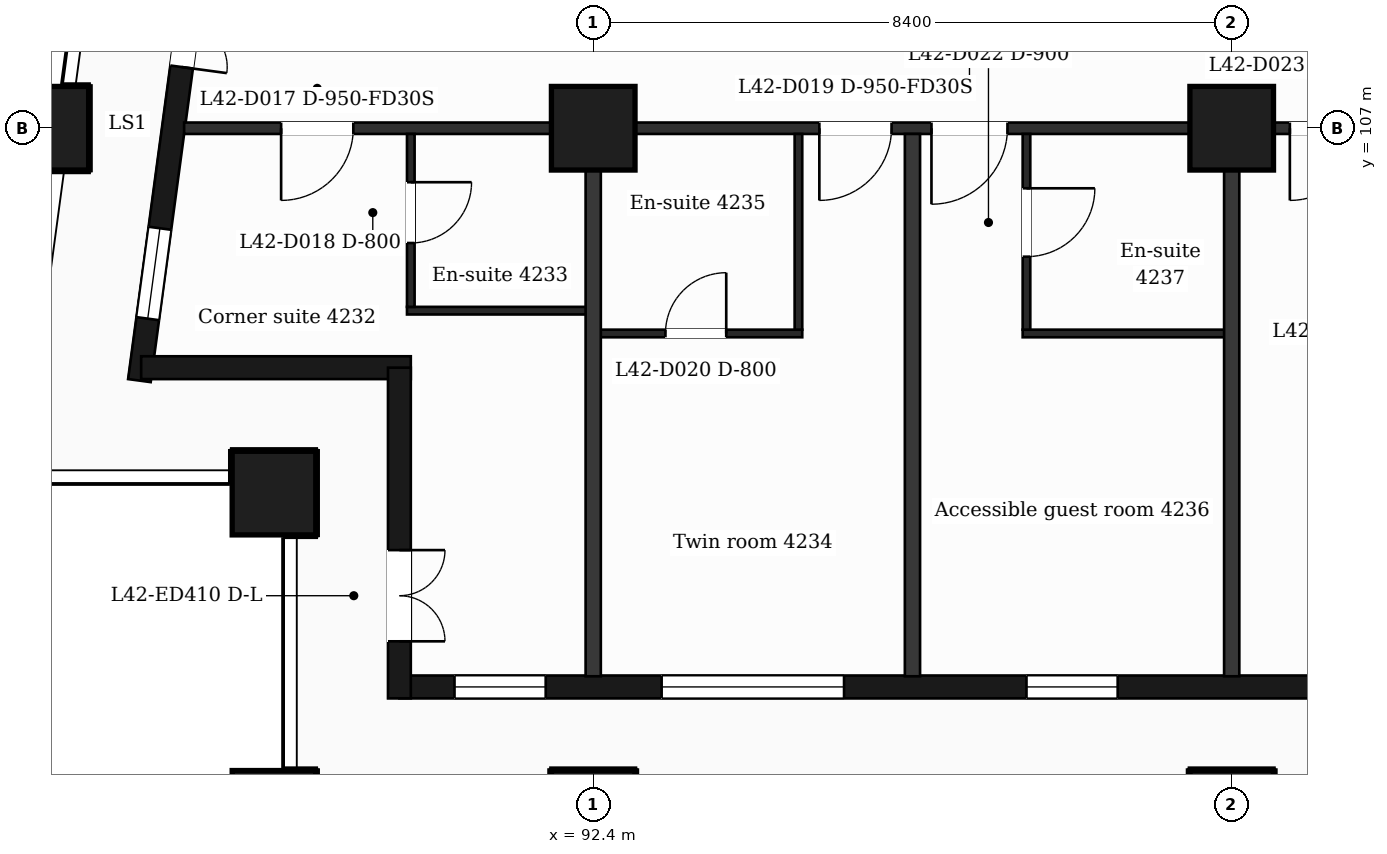
"""IFC4 building model, lengths in metres.
Left out: names, types, materials, properties, quantities, classifications, styles, units other than length and angle.
Written with IfcOpenShell. Run it as: python <this file> out.ifc"""

import sys

from ifc_helpers import new_model, si_unit, direction, frame, frame_2d, origin, origin_2d, place, context, subcontext, project, spatial, rectangle, extrude, element, fill, save


model = new_model("IFC4")
c1 = context("Model", 3, precision=1e-05, world=origin(), true_north=direction((0.0, 1.0)))
c2 = subcontext(c1, "Body", "Model", "MODEL_VIEW")
j1 = project(units=[si_unit("LENGTHUNIT", "METRE"), si_unit("PLANEANGLEUNIT", "RADIAN")], contexts=[c1])
p1 = place(None, origin())
s1 = spatial("IfcSite", under=j1, at=p1, CompositionType="ELEMENT")
p2 = place(p1, origin())
s2 = spatial("IfcBuilding", under=s1, at=p2, CompositionType="ELEMENT")
p3 = place(p2, frame((0.0, 0.0, 177.4)))
s3 = spatial("IfcBuildingStorey", under=s2, at=p3, CompositionType="ELEMENT", Elevation=177.4)
for number, where, z_axis, x_axis in (
    (1, (92.4, 98.0, 0.0), (0.0, 0.0, 1.0), (1.0, 0.0, 0.0)),
    (2, (100.8, 98.0, 0.0), (0.0, 0.0, 1.0), (1.0, 0.0, 0.0)),
    (3, (88.2, 98.0, 0.0), (0.0, 0.0, 1.0), (1.0, 0.0, 0.0)),
    (4, (88.2, 102.2, 0.0), (0.0, 0.0, 1.0), (1.0, 0.0, 0.0)),
    (5, (92.4, 107.0, 0.0), (0.0, 0.0, 1.0), (1.0, 0.0, 0.0)),
    (6, (100.8, 107.0, 0.0), (0.0, 0.0, 1.0), (1.0, 0.0, 0.0)),
    (7, (85.211, 107.0, 0.0), (0.0, 0.0, 1.0), (1.0, 0.0, 0.0)),
):
    element("IfcColumn", number, at=place(p3, frame(where, z_axis=z_axis, x_axis=x_axis)), inside=s3, PredefinedType="COLUMN", context=c2, shape_type="SweptSolid", body=[
        extrude(rectangle(XDim=1.1, YDim=1.1, at=origin_2d()), origin(), (0.0, 0.0, 1.0), 3.7),
    ])
p4 = place(p3, frame((89.85, 99.65, 0.0), z_axis=(0.0, 0.0, 1.0), x_axis=(1.0, 0.0, 0.0)))
e8 = element("IfcWall", 8, at=p4, inside=s3, PredefinedType="SOLIDWALL", context=c2, shape_type="SweptSolid", body=[
    extrude(rectangle(XDim=47.25, YDim=0.3, at=frame_2d((23.625, 0.0))), origin(), (0.0, 0.0, 1.0), 3.38),
])
p5 = place(p4, frame((0.725, 0.0, 0.9)))
e9 = element("IfcOpeningElement", 9, at=p5, cuts=e8, PredefinedType="OPENING", context=c2, shape_type="SweptSolid", body=[
    extrude(rectangle(XDim=1.2, YDim=2.1, at=frame_2d((0.6, 1.05))), frame((0.0, 0.16, 0.0), z_axis=(0.0, -1.0, 0.0), x_axis=(1.0, 0.0, 0.0)), (0.0, 0.0, 1.0), 0.32),
])
p6 = place(p4, frame((3.45, 0.0, 0.9)))
e10 = element("IfcOpeningElement", 10, at=p6, cuts=e8, PredefinedType="OPENING", context=c2, shape_type="SweptSolid", body=[
    extrude(rectangle(XDim=2.4, YDim=2.1, at=frame_2d((1.2, 1.05))), frame((0.0, 0.16, 0.0), z_axis=(0.0, -1.0, 0.0), x_axis=(1.0, 0.0, 0.0)), (0.0, 0.0, 1.0), 0.32),
])
p7 = place(p4, frame((8.25, 0.0, 0.9)))
e11 = element("IfcOpeningElement", 11, at=p7, cuts=e8, PredefinedType="OPENING", context=c2, shape_type="SweptSolid", body=[
    extrude(rectangle(XDim=1.2, YDim=2.1, at=frame_2d((0.6, 1.05))), frame((0.0, 0.16, 0.0), z_axis=(0.0, -1.0, 0.0), x_axis=(1.0, 0.0, 0.0)), (0.0, 0.0, 1.0), 0.32),
])
p8 = place(p4, frame((12.45, 0.0, 0.9)))
e12 = element("IfcOpeningElement", 12, at=p8, cuts=e8, PredefinedType="OPENING", context=c2, shape_type="SweptSolid", body=[
    extrude(rectangle(XDim=1.2, YDim=2.1, at=frame_2d((0.6, 1.05))), frame((0.0, 0.16, 0.0), z_axis=(0.0, -1.0, 0.0), x_axis=(1.0, 0.0, 0.0)), (0.0, 0.0, 1.0), 0.32),
])
p9 = place(p4, frame((16.05, 0.0, 0.9)))
e13 = element("IfcOpeningElement", 13, at=p9, cuts=e8, PredefinedType="OPENING", context=c2, shape_type="SweptSolid", body=[
    extrude(rectangle(XDim=2.4, YDim=2.1, at=frame_2d((1.2, 1.05))), frame((0.0, 0.16, 0.0), z_axis=(0.0, -1.0, 0.0), x_axis=(1.0, 0.0, 0.0)), (0.0, 0.0, 1.0), 0.32),
])
p10 = place(p4, frame((20.25, 0.0, 0.9)))
e14 = element("IfcOpeningElement", 14, at=p10, cuts=e8, PredefinedType="OPENING", context=c2, shape_type="SweptSolid", body=[
    extrude(rectangle(XDim=2.4, YDim=2.1, at=frame_2d((1.2, 1.05))), frame((0.0, 0.16, 0.0), z_axis=(0.0, -1.0, 0.0), x_axis=(1.0, 0.0, 0.0)), (0.0, 0.0, 1.0), 0.32),
])
p11 = place(p4, frame((25.05, 0.0, 0.0)))
e15 = element("IfcOpeningElement", 15, at=p11, cuts=e8, PredefinedType="OPENING", context=c2, shape_type="SweptSolid", body=[
    extrude(rectangle(XDim=1.2, YDim=2.4, at=frame_2d((0.6, 1.2))), frame((0.0, 0.16, 0.0), z_axis=(0.0, -1.0, 0.0), x_axis=(1.0, 0.0, 0.0)), (0.0, 0.0, 1.0), 0.32),
])
p12 = place(p4, frame((28.65, 0.0, 0.9)))
e16 = element("IfcOpeningElement", 16, at=p12, cuts=e8, PredefinedType="OPENING", context=c2, shape_type="SweptSolid", body=[
    extrude(rectangle(XDim=2.4, YDim=2.1, at=frame_2d((1.2, 1.05))), frame((0.0, 0.16, 0.0), z_axis=(0.0, -1.0, 0.0), x_axis=(1.0, 0.0, 0.0)), (0.0, 0.0, 1.0), 0.32),
])
p13 = place(p4, frame((32.85, 0.0, 0.9)))
e17 = element("IfcOpeningElement", 17, at=p13, cuts=e8, PredefinedType="OPENING", context=c2, shape_type="SweptSolid", body=[
    extrude(rectangle(XDim=2.4, YDim=2.1, at=frame_2d((1.2, 1.05))), frame((0.0, 0.16, 0.0), z_axis=(0.0, -1.0, 0.0), x_axis=(1.0, 0.0, 0.0)), (0.0, 0.0, 1.0), 0.32),
])
p14 = place(p4, frame((37.65, 0.0, 0.9)))
e18 = element("IfcOpeningElement", 18, at=p14, cuts=e8, PredefinedType="OPENING", context=c2, shape_type="SweptSolid", body=[
    extrude(rectangle(XDim=1.2, YDim=2.1, at=frame_2d((0.6, 1.05))), frame((0.0, 0.16, 0.0), z_axis=(0.0, -1.0, 0.0), x_axis=(1.0, 0.0, 0.0)), (0.0, 0.0, 1.0), 0.32),
])
p15 = place(p4, frame((41.85, 0.0, 0.9)))
e19 = element("IfcOpeningElement", 19, at=p15, cuts=e8, PredefinedType="OPENING", context=c2, shape_type="SweptSolid", body=[
    extrude(rectangle(XDim=1.2, YDim=2.1, at=frame_2d((0.6, 1.05))), frame((0.0, 0.16, 0.0), z_axis=(0.0, -1.0, 0.0), x_axis=(1.0, 0.0, 0.0)), (0.0, 0.0, 1.0), 0.32),
])
p16 = place(p4, frame((45.25, 0.0, 0.9)))
e20 = element("IfcOpeningElement", 20, at=p16, cuts=e8, PredefinedType="OPENING", context=c2, shape_type="SweptSolid", body=[
    extrude(rectangle(XDim=1.2, YDim=2.1, at=frame_2d((0.6, 1.05))), frame((0.0, 0.16, 0.0), z_axis=(0.0, -1.0, 0.0), x_axis=(1.0, 0.0, 0.0)), (0.0, 0.0, 1.0), 0.32),
])
p17 = place(p3, frame((87.334, 110.4, 0.0), z_axis=(0.0, 0.0, 1.0), x_axis=(-0.133437175554, -0.991057273915, 0.0)))
e21 = element("IfcWall", 21, at=p17, inside=s3, PredefinedType="SOLIDWALL", context=c2, shape_type="SweptSolid", body=[
    extrude(rectangle(XDim=6.781, YDim=0.3, at=frame_2d((3.39, 0.0))), origin(), (0.0, 0.0, 1.0), 3.38),
])
p18 = place(p17, frame((1.418, 0.0, 0.0)))
e22 = element("IfcOpeningElement", 22, at=p18, cuts=e21, PredefinedType="OPENING", context=c2, shape_type="SweptSolid", body=[
    extrude(rectangle(XDim=1.2, YDim=2.4, at=frame_2d((0.6, 1.2))), frame((0.0, 0.16, 0.0), z_axis=(0.0, -1.0, 0.0), x_axis=(1.0, 0.0, 0.0)), (0.0, 0.0, 1.0), 0.32),
])
p19 = place(p17, frame((4.758, 0.0, 0.9)))
e23 = element("IfcOpeningElement", 23, at=p19, cuts=e21, PredefinedType="OPENING", context=c2, shape_type="SweptSolid", body=[
    extrude(rectangle(XDim=1.2, YDim=2.1, at=frame_2d((0.6, 1.05))), frame((0.0, 0.16, 0.0), z_axis=(0.0, -1.0, 0.0), x_axis=(1.0, 0.0, 0.0)), (0.0, 0.0, 1.0), 0.32),
])
p20 = place(p3, frame((86.452, 103.85, 0.0), z_axis=(0.0, 0.0, 1.0), x_axis=(1.0, 0.0, 0.0)))
e24 = element("IfcWall", 24, at=p20, inside=s3, PredefinedType="SOLIDWALL", context=c2, shape_type="SweptSolid", body=[
    extrude(rectangle(XDim=3.548, YDim=0.3, at=frame_2d((1.774, 0.0))), origin(), (0.0, 0.0, 1.0), 3.38),
])
p21 = place(p3, frame((89.85, 103.85, 0.0), z_axis=(0.0, 0.0, 1.0), x_axis=(0.0, -1.0, 0.0)))
e25 = element("IfcWall", 25, at=p21, inside=s3, PredefinedType="SOLIDWALL", context=c2, shape_type="SweptSolid", body=[
    extrude(rectangle(XDim=4.35, YDim=0.3, at=frame_2d((2.175, 0.0))), origin(), (0.0, 0.0, 1.0), 3.38),
])
p22 = place(p21, frame((2.4, 0.0, 0.0)))
e26 = element("IfcOpeningElement", 26, at=p22, cuts=e25, PredefinedType="OPENING", context=c2, shape_type="SweptSolid", body=[
    extrude(rectangle(XDim=1.2, YDim=2.4, at=frame_2d((0.6, 1.2))), frame((0.0, 0.16, 0.0), z_axis=(0.0, -1.0, 0.0), x_axis=(1.0, 0.0, 0.0)), (0.0, 0.0, 1.0), 0.32),
])
p23 = place(p3, frame((92.4, 104.3, 0.0), z_axis=(0.0, 0.0, 1.0), x_axis=(1.0, 0.0, 0.0)))
e27 = element("IfcWall", 27, at=p23, inside=s3, PredefinedType="PARTITIONING", context=c2, shape_type="SweptSolid", body=[
    extrude(rectangle(XDim=2.75, YDim=0.1, at=frame_2d((1.375, 0.0))), origin(), (0.0, 0.0, 1.0), 3.38),
])
p24 = place(p23, frame((0.95, 0.0, 0.0)))
e28 = element("IfcOpeningElement", 28, at=p24, cuts=e27, PredefinedType="OPENING", context=c2, shape_type="SweptSolid", body=[
    extrude(rectangle(XDim=0.8, YDim=2.1, at=frame_2d((0.4, 1.05))), frame((0.0, 0.06, 0.0), z_axis=(0.0, -1.0, 0.0), x_axis=(1.0, 0.0, 0.0)), (0.0, 0.0, 1.0), 0.12),
])
p25 = place(p3, frame((98.05, 104.3, 0.0), z_axis=(0.0, 0.0, 1.0), x_axis=(1.0, 0.0, 0.0)))
e29 = element("IfcWall", 29, at=p25, inside=s3, PredefinedType="PARTITIONING", context=c2, shape_type="SweptSolid", body=[
    extrude(rectangle(XDim=2.75, YDim=0.1, at=frame_2d((1.375, 0.0))), origin(), (0.0, 0.0, 1.0), 3.38),
])
p26 = place(p3, frame((89.95, 104.6, 0.0), z_axis=(0.0, 0.0, 1.0), x_axis=(1.0, 0.0, 0.0)))
e30 = element("IfcWall", 30, at=p26, inside=s3, PredefinedType="PARTITIONING", context=c2, shape_type="SweptSolid", body=[
    extrude(rectangle(XDim=2.45, YDim=0.1, at=frame_2d((1.225, 0.0))), origin(), (0.0, 0.0, 1.0), 3.38),
])
p27 = place(p3, frame((87.018, 107.0, 0.0), z_axis=(0.0, 0.0, 1.0), x_axis=(1.0, 0.0, 0.0)))
e31 = element("IfcWall", 31, at=p27, inside=s3, PredefinedType="PARTITIONING", context=c2, shape_type="SweptSolid", body=[
    extrude(rectangle(XDim=52.765, YDim=0.15, at=frame_2d((26.382, 0.0))), origin(), (0.0, 0.0, 1.0), 3.38),
])
p28 = place(p27, frame((1.276, 0.0, 0.0)))
e32 = element("IfcOpeningElement", 32, at=p28, cuts=e31, PredefinedType="OPENING", context=c2, shape_type="SweptSolid", body=[
    extrude(rectangle(XDim=0.95, YDim=2.1, at=frame_2d((0.475, 1.05))), frame((0.0, 0.085, 0.0), z_axis=(0.0, -1.0, 0.0), x_axis=(1.0, 0.0, 0.0)), (0.0, 0.0, 1.0), 0.17),
])
p29 = place(p27, frame((8.357, 0.0, 0.0)))
e33 = element("IfcOpeningElement", 33, at=p29, cuts=e31, PredefinedType="OPENING", context=c2, shape_type="SweptSolid", body=[
    extrude(rectangle(XDim=0.95, YDim=2.1, at=frame_2d((0.475, 1.05))), frame((0.0, 0.085, 0.0), z_axis=(0.0, -1.0, 0.0), x_axis=(1.0, 0.0, 0.0)), (0.0, 0.0, 1.0), 0.17),
])
p30 = place(p27, frame((9.832, 0.0, 0.0)))
e34 = element("IfcOpeningElement", 34, at=p30, cuts=e31, PredefinedType="OPENING", context=c2, shape_type="SweptSolid", body=[
    extrude(rectangle(XDim=1.0, YDim=2.1, at=frame_2d((0.5, 1.05))), frame((0.0, 0.085, 0.0), z_axis=(0.0, -1.0, 0.0), x_axis=(1.0, 0.0, 0.0)), (0.0, 0.0, 1.0), 0.17),
])
p31 = place(p27, frame((14.547, 0.0, 0.0)))
e35 = element("IfcOpeningElement", 35, at=p31, cuts=e31, PredefinedType="OPENING", context=c2, shape_type="SweptSolid", body=[
    extrude(rectangle(XDim=0.95, YDim=2.1, at=frame_2d((0.475, 1.05))), frame((0.0, 0.085, 0.0), z_axis=(0.0, -1.0, 0.0), x_axis=(1.0, 0.0, 0.0)), (0.0, 0.0, 1.0), 0.17),
])
p32 = place(p27, frame((18.257, 0.0, 0.0)))
e36 = element("IfcOpeningElement", 36, at=p32, cuts=e31, PredefinedType="OPENING", context=c2, shape_type="SweptSolid", body=[
    extrude(rectangle(XDim=0.95, YDim=2.1, at=frame_2d((0.475, 1.05))), frame((0.0, 0.085, 0.0), z_axis=(0.0, -1.0, 0.0), x_axis=(1.0, 0.0, 0.0)), (0.0, 0.0, 1.0), 0.17),
])
p33 = place(p27, frame((25.212, 0.0, 0.0)))
e37 = element("IfcOpeningElement", 37, at=p33, cuts=e31, PredefinedType="OPENING", context=c2, shape_type="SweptSolid", body=[
    extrude(rectangle(XDim=1.0, YDim=2.1, at=frame_2d((0.5, 1.05))), frame((0.0, 0.085, 0.0), z_axis=(0.0, -1.0, 0.0), x_axis=(1.0, 0.0, 0.0)), (0.0, 0.0, 1.0), 0.17),
])
p34 = place(p27, frame((37.267, 0.0, 0.0)))
e38 = element("IfcOpeningElement", 38, at=p34, cuts=e31, PredefinedType="OPENING", context=c2, shape_type="SweptSolid", body=[
    extrude(rectangle(XDim=0.95, YDim=2.1, at=frame_2d((0.475, 1.05))), frame((0.0, 0.085, 0.0), z_axis=(0.0, -1.0, 0.0), x_axis=(1.0, 0.0, 0.0)), (0.0, 0.0, 1.0), 0.17),
])
p35 = place(p27, frame((41.957, 0.0, 0.0)))
e39 = element("IfcOpeningElement", 39, at=p35, cuts=e31, PredefinedType="OPENING", context=c2, shape_type="SweptSolid", body=[
    extrude(rectangle(XDim=0.95, YDim=2.1, at=frame_2d((0.475, 1.05))), frame((0.0, 0.085, 0.0), z_axis=(0.0, -1.0, 0.0), x_axis=(1.0, 0.0, 0.0)), (0.0, 0.0, 1.0), 0.17),
])
p36 = place(p27, frame((45.632, 0.0, 0.0)))
e40 = element("IfcOpeningElement", 40, at=p36, cuts=e31, PredefinedType="OPENING", context=c2, shape_type="SweptSolid", body=[
    extrude(rectangle(XDim=0.95, YDim=2.1, at=frame_2d((0.475, 1.05))), frame((0.0, 0.085, 0.0), z_axis=(0.0, -1.0, 0.0), x_axis=(1.0, 0.0, 0.0)), (0.0, 0.0, 1.0), 0.17),
])
p37 = place(p27, frame((48.767, 0.0, 0.0)))
e41 = element("IfcOpeningElement", 41, at=p37, cuts=e31, PredefinedType="OPENING", context=c2, shape_type="SweptSolid", body=[
    extrude(rectangle(XDim=0.95, YDim=2.1, at=frame_2d((0.475, 1.05))), frame((0.0, 0.085, 0.0), z_axis=(0.0, -1.0, 0.0), x_axis=(1.0, 0.0, 0.0)), (0.0, 0.0, 1.0), 0.17),
])
p38 = place(p3, frame((90.0, 104.65, 0.0), z_axis=(0.0, 0.0, 1.0), x_axis=(0.0, 1.0, 0.0)))
e42 = element("IfcWall", 42, at=p38, inside=s3, PredefinedType="PARTITIONING", context=c2, shape_type="SweptSolid", body=[
    extrude(rectangle(XDim=2.275, YDim=0.1, at=frame_2d((1.138, 0.0))), origin(), (0.0, 0.0, 1.0), 3.38),
])
p39 = place(p38, frame((0.84, 0.0, 0.0)))
e43 = element("IfcOpeningElement", 43, at=p39, cuts=e42, PredefinedType="OPENING", context=c2, shape_type="SweptSolid", body=[
    extrude(rectangle(XDim=0.8, YDim=2.1, at=frame_2d((0.4, 1.05))), frame((0.0, 0.06, 0.0), z_axis=(0.0, -1.0, 0.0), x_axis=(1.0, 0.0, 0.0)), (0.0, 0.0, 1.0), 0.12),
])
p40 = place(p3, frame((92.4, 99.79, 0.0), z_axis=(0.0, 0.0, 1.0), x_axis=(0.0, 1.0, 0.0)))
e44 = element("IfcWall", 44, at=p40, inside=s3, PredefinedType="PARTITIONING", context=c2, shape_type="SweptSolid", body=[
    extrude(rectangle(XDim=7.135, YDim=0.2, at=frame_2d((3.567, 0.0))), origin(), (0.0, 0.0, 1.0), 3.38),
])
p41 = place(p3, frame((95.1, 104.35, 0.0), z_axis=(0.0, 0.0, 1.0), x_axis=(0.0, 1.0, 0.0)))
e45 = element("IfcWall", 45, at=p41, inside=s3, PredefinedType="PARTITIONING", context=c2, shape_type="SweptSolid", body=[
    extrude(rectangle(XDim=2.575, YDim=0.1, at=frame_2d((1.288, 0.0))), origin(), (0.0, 0.0, 1.0), 3.38),
])
p42 = place(p3, frame((96.6, 99.79, 0.0), z_axis=(0.0, 0.0, 1.0), x_axis=(0.0, 1.0, 0.0)))
e46 = element("IfcWall", 46, at=p42, inside=s3, PredefinedType="PARTITIONING", context=c2, shape_type="SweptSolid", body=[
    extrude(rectangle(XDim=7.135, YDim=0.2, at=frame_2d((3.567, 0.0))), origin(), (0.0, 0.0, 1.0), 3.38),
])
p43 = place(p3, frame((98.1, 104.35, 0.0), z_axis=(0.0, 0.0, 1.0), x_axis=(0.0, 1.0, 0.0)))
e47 = element("IfcWall", 47, at=p43, inside=s3, PredefinedType="PARTITIONING", context=c2, shape_type="SweptSolid", body=[
    extrude(rectangle(XDim=2.575, YDim=0.1, at=frame_2d((1.288, 0.0))), origin(), (0.0, 0.0, 1.0), 3.38),
])
p44 = place(p43, frame((0.96, 0.0, 0.0)))
e48 = element("IfcOpeningElement", 48, at=p44, cuts=e47, PredefinedType="OPENING", context=c2, shape_type="SweptSolid", body=[
    extrude(rectangle(XDim=0.9, YDim=2.1, at=frame_2d((0.45, 1.05))), frame((0.0, 0.06, 0.0), z_axis=(0.0, -1.0, 0.0), x_axis=(1.0, 0.0, 0.0)), (0.0, 0.0, 1.0), 0.12),
])
p45 = place(p3, frame((100.8, 99.79, 0.0), z_axis=(0.0, 0.0, 1.0), x_axis=(0.0, 1.0, 0.0)))
e49 = element("IfcWall", 49, at=p45, inside=s3, PredefinedType="PARTITIONING", context=c2, shape_type="SweptSolid", body=[
    extrude(rectangle(XDim=7.135, YDim=0.2, at=frame_2d((3.567, 0.0))), origin(), (0.0, 0.0, 1.0), 3.38),
])
p46 = place(p5, origin())
e50 = element("IfcWindow", 50, at=p46, inside=s3, PartitioningType="SINGLE_PANEL", PredefinedType="WINDOW", context=c2, shape_type="SweptSolid", body=[
    extrude(rectangle(XDim=1.2, YDim=2.1, at=frame_2d((0.6, 1.05))), frame((0.0, 0.03, 0.0), z_axis=(0.0, -1.0, 0.0), x_axis=(1.0, 0.0, 0.0)), (0.0, 0.0, 1.0), 0.06),
])
fill(e9, e50)
p47 = place(p6, origin())
e51 = element("IfcWindow", 51, at=p47, inside=s3, PartitioningType="SINGLE_PANEL", PredefinedType="WINDOW", context=c2, shape_type="SweptSolid", body=[
    extrude(rectangle(XDim=2.4, YDim=2.1, at=frame_2d((1.2, 1.05))), frame((0.0, 0.03, 0.0), z_axis=(0.0, -1.0, 0.0), x_axis=(1.0, 0.0, 0.0)), (0.0, 0.0, 1.0), 0.06),
])
fill(e10, e51)
p48 = place(p7, origin())
e52 = element("IfcWindow", 52, at=p48, inside=s3, PartitioningType="SINGLE_PANEL", PredefinedType="WINDOW", context=c2, shape_type="SweptSolid", body=[
    extrude(rectangle(XDim=1.2, YDim=2.1, at=frame_2d((0.6, 1.05))), frame((0.0, 0.03, 0.0), z_axis=(0.0, -1.0, 0.0), x_axis=(1.0, 0.0, 0.0)), (0.0, 0.0, 1.0), 0.06),
])
fill(e11, e52)
p49 = place(p18, origin())
e53 = element("IfcDoor", 53, at=p49, inside=s3, OperationType="DOUBLE_DOOR_SINGLE_SWING", PredefinedType="DOOR", context=c2, shape_type="SweptSolid", body=[
    extrude(rectangle(XDim=1.2, YDim=2.4, at=frame_2d((0.6, 1.2))), frame((0.0, 0.025, 0.0), z_axis=(0.0, -1.0, 0.0), x_axis=(1.0, 0.0, 0.0)), (0.0, 0.0, 1.0), 0.05),
])
fill(e22, e53)
p50 = place(p19, origin())
e54 = element("IfcWindow", 54, at=p50, inside=s3, PartitioningType="SINGLE_PANEL", PredefinedType="WINDOW", context=c2, shape_type="SweptSolid", body=[
    extrude(rectangle(XDim=1.2, YDim=2.1, at=frame_2d((0.6, 1.05))), frame((0.0, 0.03, 0.0), z_axis=(0.0, -1.0, 0.0), x_axis=(1.0, 0.0, 0.0)), (0.0, 0.0, 1.0), 0.06),
])
fill(e23, e54)
p51 = place(p22, origin())
e55 = element("IfcDoor", 55, at=p51, inside=s3, OperationType="DOUBLE_DOOR_SINGLE_SWING", PredefinedType="DOOR", context=c2, shape_type="SweptSolid", body=[
    extrude(rectangle(XDim=1.2, YDim=2.4, at=frame_2d((0.6, 1.2))), frame((0.0, 0.025, 0.0), z_axis=(0.0, -1.0, 0.0), x_axis=(1.0, 0.0, 0.0)), (0.0, 0.0, 1.0), 0.05),
])
fill(e26, e55)
p52 = place(p28, origin())
e56 = element("IfcDoor", 56, at=p52, inside=s3, OperationType="SINGLE_SWING_LEFT", PredefinedType="DOOR", context=c2, shape_type="SweptSolid", body=[
    extrude(rectangle(XDim=0.95, YDim=2.1, at=frame_2d((0.475, 1.05))), frame((0.0, 0.025, 0.0), z_axis=(0.0, -1.0, 0.0), x_axis=(1.0, 0.0, 0.0)), (0.0, 0.0, 1.0), 0.05),
])
fill(e32, e56)
p53 = place(p39, origin())
e57 = element("IfcDoor", 57, at=p53, inside=s3, OperationType="SINGLE_SWING_RIGHT", PredefinedType="DOOR", context=c2, shape_type="SweptSolid", body=[
    extrude(rectangle(XDim=0.8, YDim=2.1, at=frame_2d((0.4, 1.05))), frame((0.0, 0.025, 0.0), z_axis=(0.0, -1.0, 0.0), x_axis=(1.0, 0.0, 0.0)), (0.0, 0.0, 1.0), 0.05),
])
fill(e43, e57)
p54 = place(p29, origin())
e58 = element("IfcDoor", 58, at=p54, inside=s3, OperationType="SINGLE_SWING_LEFT", PredefinedType="DOOR", context=c2, shape_type="SweptSolid", body=[
    extrude(rectangle(XDim=0.95, YDim=2.1, at=frame_2d((0.475, 1.05))), frame((0.0, 0.025, 0.0), z_axis=(0.0, -1.0, 0.0), x_axis=(1.0, 0.0, 0.0)), (0.0, 0.0, 1.0), 0.05),
])
fill(e33, e58)
p55 = place(p24, origin())
e59 = element("IfcDoor", 59, at=p55, inside=s3, OperationType="SINGLE_SWING_RIGHT", PredefinedType="DOOR", context=c2, shape_type="SweptSolid", body=[
    extrude(rectangle(XDim=0.8, YDim=2.1, at=frame_2d((0.4, 1.05))), frame((0.0, 0.025, 0.0), z_axis=(0.0, -1.0, 0.0), x_axis=(1.0, 0.0, 0.0)), (0.0, 0.0, 1.0), 0.05),
])
fill(e28, e59)
p56 = place(p30, origin())
e60 = element("IfcDoor", 60, at=p56, inside=s3, OperationType="SINGLE_SWING_LEFT", PredefinedType="DOOR", context=c2, shape_type="SweptSolid", body=[
    extrude(rectangle(XDim=1.0, YDim=2.1, at=frame_2d((0.5, 1.05))), frame((0.0, 0.025, 0.0), z_axis=(0.0, -1.0, 0.0), x_axis=(1.0, 0.0, 0.0)), (0.0, 0.0, 1.0), 0.05),
])
fill(e34, e60)
p57 = place(p44, origin())
e61 = element("IfcDoor", 61, at=p57, inside=s3, OperationType="SINGLE_SWING_RIGHT", PredefinedType="DOOR", context=c2, shape_type="SweptSolid", body=[
    extrude(rectangle(XDim=0.9, YDim=2.1, at=frame_2d((0.45, 1.05))), frame((0.0, 0.025, 0.0), z_axis=(0.0, -1.0, 0.0), x_axis=(1.0, 0.0, 0.0)), (0.0, 0.0, 1.0), 0.05),
])
fill(e48, e61)
p58 = place(p31, origin())
e62 = element("IfcDoor", 62, at=p58, inside=s3, OperationType="SINGLE_SWING_LEFT", PredefinedType="DOOR", context=c2, shape_type="SweptSolid", body=[
    extrude(rectangle(XDim=0.95, YDim=2.1, at=frame_2d((0.475, 1.05))), frame((0.0, 0.025, 0.0), z_axis=(0.0, -1.0, 0.0), x_axis=(1.0, 0.0, 0.0)), (0.0, 0.0, 1.0), 0.05),
])
fill(e35, e62)
save(model, sys.argv[1])
